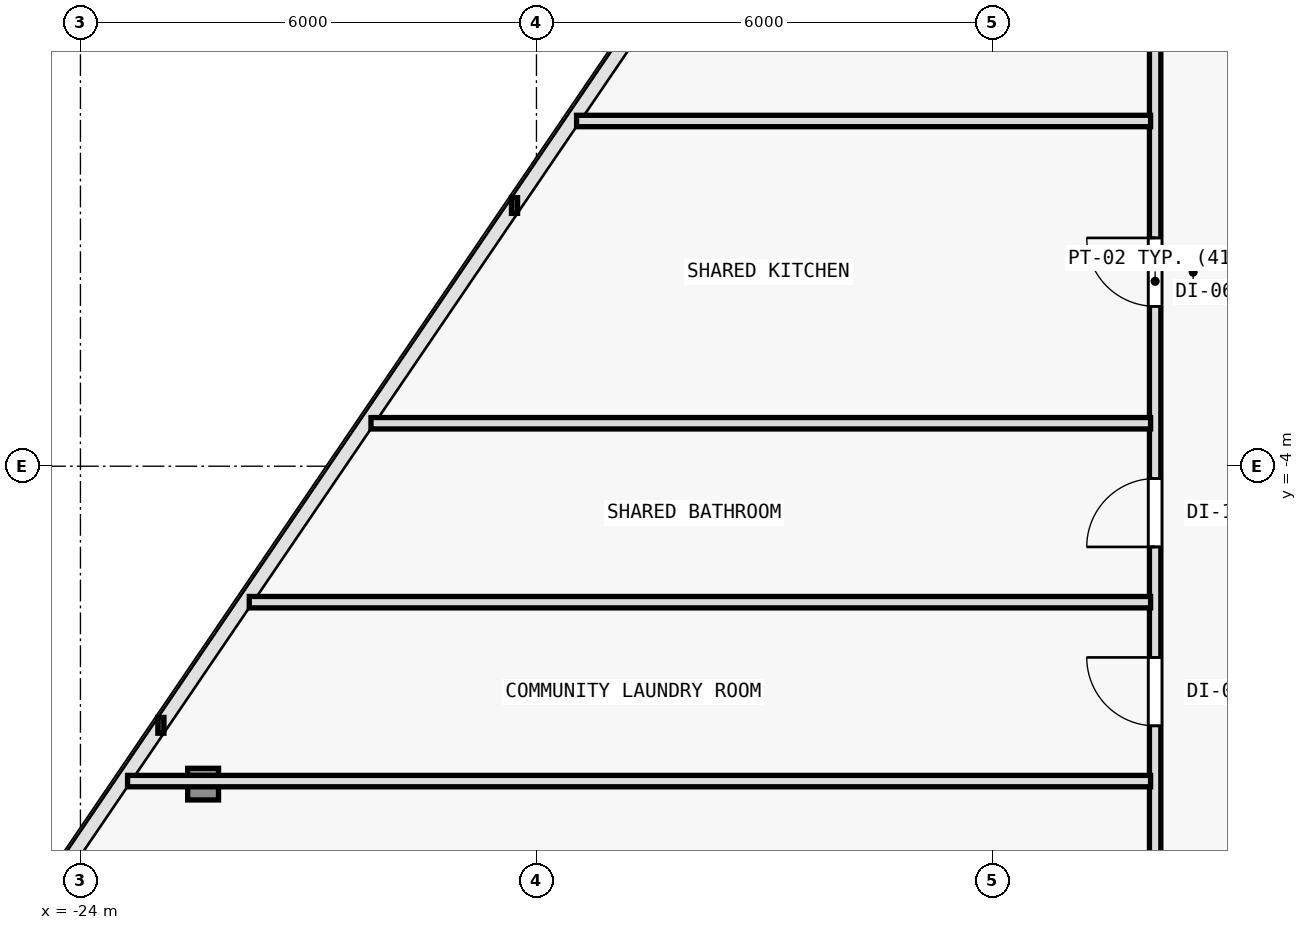
"""IFC4 building model, lengths in metres.
Left out: names, types, materials, properties, quantities, classifications, styles, units other than length and angle.
Written with IfcOpenShell. Run it as: python <this file> out.ifc"""

import sys

from ifc_helpers import new_model, si_unit, direction, frame, frame_2d, origin, origin_2d, place, context, subcontext, project, spatial, rectangle, i_section, extrude, element, fill, save


model = new_model("IFC4")
c1 = context("Model", 3, precision=1e-05, world=origin(), true_north=direction((0.0, 1.0)))
c2 = subcontext(c1, "Body", "Model", "MODEL_VIEW")
j1 = project(units=[si_unit("LENGTHUNIT", "METRE"), si_unit("PLANEANGLEUNIT", "RADIAN")], contexts=[c1])
p1 = place(None, origin())
s1 = spatial("IfcSite", under=j1, at=p1, CompositionType="ELEMENT")
p2 = place(p1, origin())
s2 = spatial("IfcBuilding", under=s1, at=p2, CompositionType="ELEMENT")
p3 = place(p2, frame((0.0, 0.0, 107.7)))
s3 = spatial("IfcBuildingStorey", under=s2, at=p3, CompositionType="ELEMENT", Elevation=107.7)
p4 = place(p3, frame((-22.386, -8.183, 0.006), z_axis=(0.025903262414, 0.022231933883, 0.999417211235), x_axis=(-0.65128330188, 0.758834672832, 0.0)))
e1 = element("IfcColumn", 1, at=p4, inside=s3, PredefinedType="COLUMN", context=c2, shape_type="SweptSolid", body=[
    extrude(i_section(OverallWidth=0.406, OverallDepth=0.416, WebThickness=0.019, FlangeThickness=0.031, FilletRadius=0.015, at=origin_2d()), origin(), (0.0, 0.0, 1.0), 3.591),
])
p5 = place(p3, frame((-9.86, -11.56, 0.0), z_axis=(0.0, 0.0, 1.0), x_axis=(0.0, 1.0, 0.0)))
e2 = element("IfcWall", 2, at=p5, inside=s3, PredefinedType="PARTITIONING", context=c2, shape_type="SweptSolid", body=[
    extrude(rectangle(XDim=19.986, YDim=0.15, at=frame_2d((9.993, 0.0))), origin(), (0.0, 0.0, 1.0), 2.705),
])
p6 = place(p5, frame((9.664, 0.0, 0.0)))
e3 = element("IfcOpeningElement", 3, at=p6, cuts=e2, PredefinedType="OPENING", context=c2, shape_type="SweptSolid", body=[
    extrude(rectangle(XDim=0.9, YDim=2.1, at=frame_2d((0.45, 1.05))), frame((0.0, 0.085, 0.0), z_axis=(0.0, -1.0, 0.0), x_axis=(1.0, 0.0, 0.0)), (0.0, 0.0, 1.0), 0.17),
])
p7 = place(p5, frame((6.498, 0.0, 0.0)))
e4 = element("IfcOpeningElement", 4, at=p7, cuts=e2, PredefinedType="OPENING", context=c2, shape_type="SweptSolid", body=[
    extrude(rectangle(XDim=0.9, YDim=2.1, at=frame_2d((0.45, 1.05))), frame((0.0, 0.085, 0.0), z_axis=(0.0, -1.0, 0.0), x_axis=(1.0, 0.0, 0.0)), (0.0, 0.0, 1.0), 0.17),
])
p8 = place(p5, frame((4.144, 0.0, 0.0)))
e5 = element("IfcOpeningElement", 5, at=p8, cuts=e2, PredefinedType="OPENING", context=c2, shape_type="SweptSolid", body=[
    extrude(rectangle(XDim=0.9, YDim=2.1, at=frame_2d((0.45, 1.05))), frame((0.0, 0.085, 0.0), z_axis=(0.0, -1.0, 0.0), x_axis=(1.0, 0.0, 0.0)), (0.0, 0.0, 1.0), 0.17),
])
p9 = place(p5, frame((15.505, 0.0, 0.0)))
e6 = element("IfcOpeningElement", 6, at=p9, cuts=e2, PredefinedType="OPENING", context=c2, shape_type="SweptSolid", body=[
    extrude(rectangle(XDim=0.9, YDim=2.1, at=frame_2d((0.45, 1.05))), frame((0.0, 0.085, 0.0), z_axis=(0.0, -1.0, 0.0), x_axis=(1.0, 0.0, 0.0)), (0.0, 0.0, 1.0), 0.17),
])
p10 = place(p3, frame((-9.92, -8.143, 0.0), z_axis=(0.0, 0.0, 1.0), x_axis=(-1.0, 0.0, 0.0)))
e7 = element("IfcWall", 7, at=p10, inside=s3, PredefinedType="PARTITIONING", context=c2, shape_type="SweptSolid", body=[
    extrude(rectangle(XDim=13.46, YDim=0.15, at=frame_2d((6.73, 0.0))), origin(), (0.0, 0.0, 1.0), 2.705),
])
p11 = place(p3, frame((-9.92, 0.542, 0.0), z_axis=(0.0, 0.0, 1.0), x_axis=(-1.0, 0.0, 0.0)))
e8 = element("IfcWall", 8, at=p11, inside=s3, PredefinedType="PARTITIONING", context=c2, shape_type="SweptSolid", body=[
    extrude(rectangle(XDim=7.552, YDim=0.15, at=frame_2d((3.776, 0.0))), origin(), (0.0, 0.0, 1.0), 2.825),
])
p12 = place(p3, frame((-9.92, -3.435, 0.0), z_axis=(0.0, 0.0, 1.0), x_axis=(-1.0, 0.0, 0.0)))
e9 = element("IfcWall", 9, at=p12, inside=s3, PredefinedType="PARTITIONING", context=c2, shape_type="SweptSolid", body=[
    extrude(rectangle(XDim=10.257, YDim=0.15, at=frame_2d((5.129, 0.0))), origin(), (0.0, 0.0, 1.0), 2.825),
])
p13 = place(p3, frame((-9.92, -5.789, 0.0), z_axis=(0.0, 0.0, 1.0), x_axis=(-1.0, 0.0, 0.0)))
e10 = element("IfcWall", 10, at=p13, inside=s3, PredefinedType="PARTITIONING", context=c2, shape_type="SweptSolid", body=[
    extrude(rectangle(XDim=11.859, YDim=0.15, at=frame_2d((5.929, 0.0))), origin(), (0.0, 0.0, 1.0), 2.825),
])
p14 = place(p6, origin())
e11 = element("IfcDoor", 11, at=p14, inside=s3, OperationType="SINGLE_SWING_RIGHT", PredefinedType="DOOR", context=c2, shape_type="SweptSolid", body=[
    extrude(rectangle(XDim=0.9, YDim=2.1, at=frame_2d((0.45, 1.05))), frame((0.0, 0.025, 0.0), z_axis=(0.0, -1.0, 0.0), x_axis=(1.0, 0.0, 0.0)), (0.0, 0.0, 1.0), 0.05),
])
fill(e3, e11)
p15 = place(p7, origin())
e12 = element("IfcDoor", 12, at=p15, inside=s3, OperationType="SINGLE_SWING_LEFT", PredefinedType="DOOR", context=c2, shape_type="SweptSolid", body=[
    extrude(rectangle(XDim=0.9, YDim=2.1, at=frame_2d((0.45, 1.05))), frame((0.0, 0.025, 0.0), z_axis=(0.0, -1.0, 0.0), x_axis=(1.0, 0.0, 0.0)), (0.0, 0.0, 1.0), 0.05),
])
fill(e4, e12)
p16 = place(p8, origin())
e13 = element("IfcDoor", 13, at=p16, inside=s3, OperationType="SINGLE_SWING_RIGHT", PredefinedType="DOOR", context=c2, shape_type="SweptSolid", body=[
    extrude(rectangle(XDim=0.9, YDim=2.1, at=frame_2d((0.45, 1.05))), frame((0.0, 0.025, 0.0), z_axis=(0.0, -1.0, 0.0), x_axis=(1.0, 0.0, 0.0)), (0.0, 0.0, 1.0), 0.05),
])
fill(e5, e13)
save(model, sys.argv[1])
